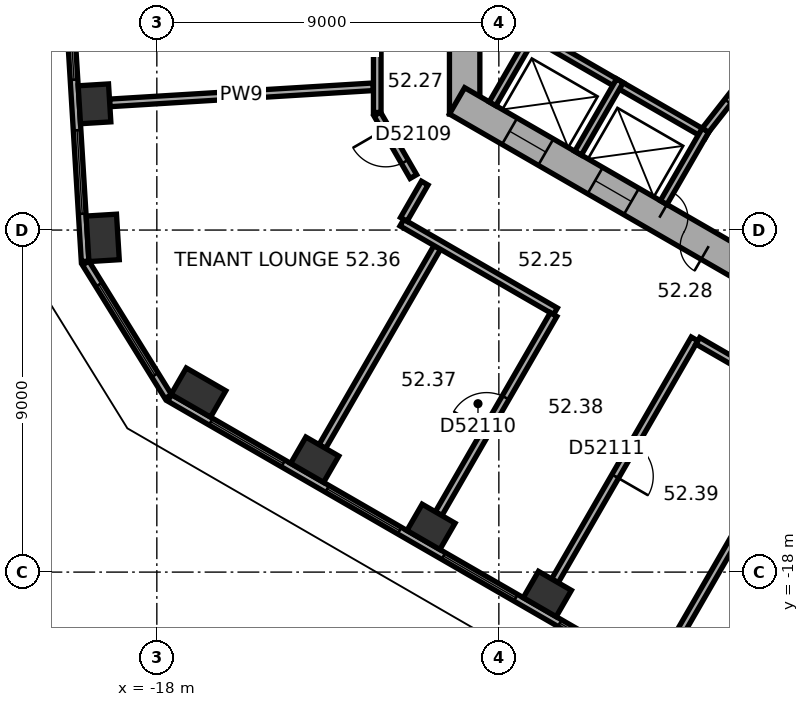
"""IFC4 building model, lengths in metres.
Left out: names, types, materials, properties, quantities, classifications, styles, units other than length and angle.
Written with IfcOpenShell. Run it as: python <this file> out.ifc"""

import sys

from ifc_helpers import new_model, si_unit, direction, frame, frame_2d, origin, origin_2d, place, context, subcontext, project, spatial, rectangle, extrude, element, fill, save


model = new_model("IFC4")
c1 = context("Model", 3, precision=1e-05, world=origin(), true_north=direction((0.0, 1.0)))
c2 = subcontext(c1, "Body", "Model", "MODEL_VIEW")
j1 = project(units=[si_unit("LENGTHUNIT", "METRE"), si_unit("PLANEANGLEUNIT", "RADIAN")], contexts=[c1])
p1 = place(None, origin())
s1 = spatial("IfcSite", under=j1, at=p1, CompositionType="ELEMENT")
p2 = place(p1, origin())
s2 = spatial("IfcBuilding", under=s1, at=p2, CompositionType="ELEMENT")
p3 = place(p2, frame((0.0, 0.0, 210.6)))
s3 = spatial("IfcBuildingStorey", under=s2, at=p3, CompositionType="ELEMENT", Elevation=210.6)
p4 = place(p3, frame((-19.64, -5.679, 0.0), z_axis=(0.0, 0.0, 1.0), x_axis=(0.061048539535, -0.998134798422, 0.0)))
e1 = element("IfcColumn", 1, at=p4, inside=s3, PredefinedType="COLUMN", context=c2, shape_type="SweptSolid", body=[
    extrude(rectangle(XDim=1.0, YDim=0.8, at=origin_2d()), origin(), (0.0, 0.0, 1.0), 3.7),
])
for number, where, z_axis, x_axis in (
    (2, (-19.424, -9.206, 0.0), (0.0, 0.0, 1.0), (0.061, -0.998, 0.0)),
    (3, (-16.906, -13.276, 0.0), (0.0, 0.0, 1.0), (0.866, -0.5, 0.0)),
):
    element("IfcColumn", number, at=place(p3, frame(where, z_axis=z_axis, x_axis=x_axis)), inside=s3, PredefinedType="COLUMN", context=c2, shape_type="SweptSolid", body=[
        extrude(rectangle(XDim=1.2, YDim=0.8, at=origin_2d()), origin(), (0.0, 0.0, 1.0), 3.7),
    ])
for number, where, z_axis, x_axis in (
    (4, (-13.845, -15.042, 0.0), (0.0, 0.0, 1.0), (0.866, -0.5, 0.0)),
    (5, (-10.785, -16.809, 0.0), (0.0, 0.0, 1.0), (0.866, -0.5, 0.0)),
    (6, (-7.725, -18.576, 0.0), (0.0, 0.0, 1.0), (0.866, -0.5, 0.0)),
):
    element("IfcColumn", number, at=place(p3, frame(where, z_axis=z_axis, x_axis=x_axis)), inside=s3, PredefinedType="COLUMN", context=c2, shape_type="SweptSolid", body=[
        extrude(rectangle(XDim=1.0, YDim=0.8, at=origin_2d()), origin(), (0.0, 0.0, 1.0), 3.7),
    ])
p5 = place(p3, frame((-9.9, 5.947, 0.0), z_axis=(0.0, 0.0, 1.0), x_axis=(0.0, -1.0, 0.0)))
e7 = element("IfcWall", 7, at=p5, inside=s3, PredefinedType="SHEAR", context=c2, shape_type="SweptSolid", body=[
    extrude(rectangle(XDim=11.894, YDim=0.8, at=frame_2d((5.947, 0.0))), origin(), (0.0, 0.0, 1.0), 3.7),
])
p6 = place(p5, frame((5.097, 0.0, 0.0)))
e8 = element("IfcOpeningElement", 8, at=p6, cuts=e7, PredefinedType="OPENING", context=c2, shape_type="SweptSolid", body=[
    extrude(rectangle(XDim=1.1, YDim=2.1, at=frame_2d((0.55, 1.05))), frame((0.0, 0.41, 0.0), z_axis=(0.0, -1.0, 0.0), x_axis=(1.0, 0.0, 0.0)), (0.0, 0.0, 1.0), 0.82),
])
p7 = place(p5, frame((7.697, 0.0, 0.0)))
e9 = element("IfcOpeningElement", 9, at=p7, cuts=e7, PredefinedType="OPENING", context=c2, shape_type="SweptSolid", body=[
    extrude(rectangle(XDim=1.1, YDim=2.1, at=frame_2d((0.55, 1.05))), frame((0.0, 0.41, 0.0), z_axis=(0.0, -1.0, 0.0), x_axis=(1.0, 0.0, 0.0)), (0.0, 0.0, 1.0), 0.82),
])
p8 = place(p3, frame((-10.1, -5.6, 0.0), z_axis=(0.0, 0.0, 1.0), x_axis=(0.866023897231, -0.500002609418, 0.0)))
e10 = element("IfcWall", 10, at=p8, inside=s3, PredefinedType="SHEAR", context=c2, shape_type="SweptSolid", body=[
    extrude(rectangle(XDim=11.894, YDim=0.8, at=frame_2d((5.947, 0.0))), origin(), (0.0, 0.0, 1.0), 3.7),
])
p9 = place(p8, frame((6.147, 0.0, 0.0)))
e11 = element("IfcOpeningElement", 11, at=p9, cuts=e10, PredefinedType="OPENING", context=c2, shape_type="SweptSolid", body=[
    extrude(rectangle(XDim=1.5, YDim=2.1, at=frame_2d((0.75, 1.05))), frame((0.0, 0.41, 0.0), z_axis=(0.0, -1.0, 0.0), x_axis=(1.0, 0.0, 0.0)), (0.0, 0.0, 1.0), 0.82),
])
p10 = place(p8, frame((1.597, 0.0, 0.0)))
e12 = element("IfcOpeningElement", 12, at=p10, cuts=e10, PredefinedType="OPENING", context=c2, shape_type="SweptSolid", body=[
    extrude(rectangle(XDim=1.1, YDim=2.1, at=frame_2d((0.55, 1.05))), frame((0.0, 0.41, 0.0), z_axis=(0.0, -1.0, 0.0), x_axis=(1.0, 0.0, 0.0)), (0.0, 0.0, 1.0), 0.82),
])
p11 = place(p8, frame((4.197, 0.0, 0.0)))
e13 = element("IfcOpeningElement", 13, at=p11, cuts=e10, PredefinedType="OPENING", context=c2, shape_type="SweptSolid", body=[
    extrude(rectangle(XDim=1.1, YDim=2.1, at=frame_2d((0.55, 1.05))), frame((0.0, 0.41, 0.0), z_axis=(0.0, -1.0, 0.0), x_axis=(1.0, 0.0, 0.0)), (0.0, 0.0, 1.0), 0.82),
])
p12 = place(p3, frame((-21.038, 8.984, 0.0), z_axis=(0.0, 0.0, 1.0), x_axis=(0.061043935634, -0.998135079998, 0.0)))
e14 = element("IfcWall", 14, at=p12, inside=s3, PredefinedType="STANDARD", context=c2, shape_type="SweptSolid", body=[
    extrude(rectangle(XDim=18.841, YDim=0.2, at=frame_2d((9.421, 0.0))), origin(), (0.0, 0.0, 1.0), 3.7),
])
p13 = place(p12, frame((1.253, 0.0, 0.9)))
e15 = element("IfcOpeningElement", 15, at=p13, cuts=e14, PredefinedType="OPENING", context=c2, shape_type="SweptSolid", body=[
    extrude(rectangle(XDim=2.2, YDim=2.0, at=frame_2d((1.1, 1.0))), frame((0.0, 0.11, 0.0), z_axis=(0.0, -1.0, 0.0), x_axis=(1.0, 0.0, 0.0)), (0.0, 0.0, 1.0), 0.22),
])
p14 = place(p12, frame((4.786, 0.0, 0.9)))
e16 = element("IfcOpeningElement", 16, at=p14, cuts=e14, PredefinedType="OPENING", context=c2, shape_type="SweptSolid", body=[
    extrude(rectangle(XDim=2.2, YDim=2.0, at=frame_2d((1.1, 1.0))), frame((0.0, 0.11, 0.0), z_axis=(0.0, -1.0, 0.0), x_axis=(1.0, 0.0, 0.0)), (0.0, 0.0, 1.0), 0.22),
])
p15 = place(p12, frame((8.32, 0.0, 0.9)))
e17 = element("IfcOpeningElement", 17, at=p15, cuts=e14, PredefinedType="OPENING", context=c2, shape_type="SweptSolid", body=[
    extrude(rectangle(XDim=2.2, YDim=2.0, at=frame_2d((1.1, 1.0))), frame((0.0, 0.11, 0.0), z_axis=(0.0, -1.0, 0.0), x_axis=(1.0, 0.0, 0.0)), (0.0, 0.0, 1.0), 0.22),
])
p16 = place(p12, frame((11.854, 0.0, 0.9)))
e18 = element("IfcOpeningElement", 18, at=p16, cuts=e14, PredefinedType="OPENING", context=c2, shape_type="SweptSolid", body=[
    extrude(rectangle(XDim=2.2, YDim=2.0, at=frame_2d((1.1, 1.0))), frame((0.0, 0.11, 0.0), z_axis=(0.0, -1.0, 0.0), x_axis=(1.0, 0.0, 0.0)), (0.0, 0.0, 1.0), 0.22),
])
p17 = place(p12, frame((15.387, 0.0, 0.9)))
e19 = element("IfcOpeningElement", 19, at=p17, cuts=e14, PredefinedType="OPENING", context=c2, shape_type="SweptSolid", body=[
    extrude(rectangle(XDim=2.2, YDim=2.0, at=frame_2d((1.1, 1.0))), frame((0.0, 0.11, 0.0), z_axis=(0.0, -1.0, 0.0), x_axis=(1.0, 0.0, 0.0)), (0.0, 0.0, 1.0), 0.22),
])
p18 = place(p3, frame((-19.873, -9.869, 0.0), z_axis=(0.0, 0.0, 1.0), x_axis=(0.52626914263, -0.850318051975, 0.0)))
e20 = element("IfcWall", 20, at=p18, inside=s3, PredefinedType="STANDARD", context=c2, shape_type="SweptSolid", body=[
    extrude(rectangle(XDim=4.13, YDim=0.2, at=frame_2d((2.065, 0.0))), origin(), (0.0, 0.0, 1.0), 3.7),
])
p19 = place(p18, frame((0.665, 0.0, 0.9)))
e21 = element("IfcOpeningElement", 21, at=p19, cuts=e20, PredefinedType="OPENING", context=c2, shape_type="SweptSolid", body=[
    extrude(rectangle(XDim=2.8, YDim=2.0, at=frame_2d((1.4, 1.0))), frame((0.0, 0.11, 0.0), z_axis=(0.0, -1.0, 0.0), x_axis=(1.0, 0.0, 0.0)), (0.0, 0.0, 1.0), 0.22),
])
p20 = place(p3, frame((-17.664, -13.415, 0.0), z_axis=(0.0, 0.0, 1.0), x_axis=(0.866026555358, -0.49999800541, 0.0)))
e22 = element("IfcWall", 22, at=p20, inside=s3, PredefinedType="STANDARD", context=c2, shape_type="SweptSolid", body=[
    extrude(rectangle(XDim=18.841, YDim=0.2, at=frame_2d((9.421, 0.0))), origin(), (0.0, 0.0, 1.0), 3.7),
])
p21 = place(p20, frame((1.254, 0.0, 0.9)))
e23 = element("IfcOpeningElement", 23, at=p21, cuts=e22, PredefinedType="OPENING", context=c2, shape_type="SweptSolid", body=[
    extrude(rectangle(XDim=2.2, YDim=2.0, at=frame_2d((1.1, 1.0))), frame((0.0, 0.11, 0.0), z_axis=(0.0, -1.0, 0.0), x_axis=(1.0, 0.0, 0.0)), (0.0, 0.0, 1.0), 0.22),
])
p22 = place(p20, frame((4.788, 0.0, 0.9)))
e24 = element("IfcOpeningElement", 24, at=p22, cuts=e22, PredefinedType="OPENING", context=c2, shape_type="SweptSolid", body=[
    extrude(rectangle(XDim=2.2, YDim=2.0, at=frame_2d((1.1, 1.0))), frame((0.0, 0.11, 0.0), z_axis=(0.0, -1.0, 0.0), x_axis=(1.0, 0.0, 0.0)), (0.0, 0.0, 1.0), 0.22),
])
p23 = place(p20, frame((8.322, 0.0, 0.9)))
e25 = element("IfcOpeningElement", 25, at=p23, cuts=e22, PredefinedType="OPENING", context=c2, shape_type="SweptSolid", body=[
    extrude(rectangle(XDim=2.2, YDim=2.0, at=frame_2d((1.1, 1.0))), frame((0.0, 0.11, 0.0), z_axis=(0.0, -1.0, 0.0), x_axis=(1.0, 0.0, 0.0)), (0.0, 0.0, 1.0), 0.22),
])
p24 = place(p20, frame((11.855, 0.0, 0.9)))
e26 = element("IfcOpeningElement", 26, at=p24, cuts=e22, PredefinedType="OPENING", context=c2, shape_type="SweptSolid", body=[
    extrude(rectangle(XDim=2.2, YDim=2.0, at=frame_2d((1.1, 1.0))), frame((0.0, 0.11, 0.0), z_axis=(0.0, -1.0, 0.0), x_axis=(1.0, 0.0, 0.0)), (0.0, 0.0, 1.0), 0.22),
])
p25 = place(p20, frame((15.389, 0.0, 0.9)))
e27 = element("IfcOpeningElement", 27, at=p25, cuts=e22, PredefinedType="OPENING", context=c2, shape_type="SweptSolid", body=[
    extrude(rectangle(XDim=2.2, YDim=2.0, at=frame_2d((1.1, 1.0))), frame((0.0, 0.11, 0.0), z_axis=(0.0, -1.0, 0.0), x_axis=(1.0, 0.0, 0.0)), (0.0, 0.0, 1.0), 0.22),
])
p26 = place(p3, frame((-8.203, -3.809, 0.0), z_axis=(0.0, 0.0, 1.0), x_axis=(0.866028230842, -0.499995103361, 0.0)))
e28 = element("IfcWall", 28, at=p26, inside=s3, PredefinedType="PARTITIONING", context=c2, shape_type="SweptSolid", body=[
    extrude(rectangle(XDim=5.4, YDim=0.2, at=frame_2d((2.7, 0.0))), origin(), (0.0, 0.0, 1.0), 3.35),
])
for number, where, z_axis, x_axis in (
    (29, (-8.067, -3.772, 0.0), (0.0, 0.0, 1.0), (-0.5, -0.866, 0.0)),
    (30, (-5.815, -5.072, 0.0), (0.0, 0.0, 1.0), (-0.5, -0.866, 0.0)),
):
    element("IfcWall", number, at=place(p3, frame(where, z_axis=z_axis, x_axis=x_axis)), inside=s3, PredefinedType="PARTITIONING", context=c2, shape_type="SweptSolid", body=[
        extrude(rectangle(XDim=2.2, YDim=0.2, at=frame_2d((1.1, 0.0))), origin(), (0.0, 0.0, 1.0), 3.35),
    ])
p27 = place(p3, frame((-3.563, -6.372, 0.0), z_axis=(0.0, 0.0, 1.0), x_axis=(-0.499994660107, -0.866028486751, 0.0)))
e31 = element("IfcWall", 31, at=p27, inside=s3, PredefinedType="PARTITIONING", context=c2, shape_type="SweptSolid", body=[
    extrude(rectangle(XDim=2.2, YDim=0.2, at=frame_2d((1.1, 0.0))), origin(), (0.0, 0.0, 1.0), 3.35),
])
p28 = place(p3, frame((-1.712, -4.008, 0.0), z_axis=(0.0, 0.0, 1.0), x_axis=(-0.616549420702, -0.787316208287, 0.0)))
e32 = element("IfcWall", 32, at=p28, inside=s3, PredefinedType="PARTITIONING", context=c2, shape_type="SweptSolid", body=[
    extrude(rectangle(XDim=3.002, YDim=0.2, at=frame_2d((1.501, 0.0))), origin(), (0.0, 0.0, 1.0), 3.35),
])
p29 = place(p28, frame((1.15, 0.0, 0.0)))
e33 = element("IfcOpeningElement", 33, at=p29, cuts=e32, PredefinedType="OPENING", context=c2, shape_type="SweptSolid", body=[
    extrude(rectangle(XDim=0.9, YDim=2.1, at=frame_2d((0.45, 1.05))), frame((0.0, 0.11, 0.0), z_axis=(0.0, -1.0, 0.0), x_axis=(1.0, 0.0, 0.0)), (0.0, 0.0, 1.0), 0.22),
])
p30 = place(p3, frame((-19.241, -5.654, 0.0), z_axis=(0.0, 0.0, 1.0), x_axis=(0.998135538818, 0.061036432963, 0.0)))
e34 = element("IfcWall", 34, at=p30, inside=s3, PredefinedType="PARTITIONING", context=c2, shape_type="SweptSolid", body=[
    extrude(rectangle(XDim=6.944, YDim=0.2, at=frame_2d((3.472, 0.0))), origin(), (0.0, 0.0, 1.0), 2.65),
])
p31 = place(p3, frame((-13.646, -14.696, 0.0), z_axis=(0.0, 0.0, 1.0), x_axis=(0.500006596359, 0.866021595341, 0.0)))
e35 = element("IfcWall", 35, at=p31, inside=s3, PredefinedType="PARTITIONING", context=c2, shape_type="SweptSolid", body=[
    extrude(rectangle(XDim=6.049, YDim=0.2, at=frame_2d((3.025, 0.0))), origin(), (0.0, 0.0, 1.0), 3.35),
])
p32 = place(p3, frame((-12.2, -5.947, 0.0), z_axis=(0.0, 0.0, 1.0), x_axis=(0.500022797313, -0.86601224135, 0.0)))
e36 = element("IfcWall", 36, at=p32, inside=s3, PredefinedType="PARTITIONING", context=c2, shape_type="SweptSolid", body=[
    extrude(rectangle(XDim=1.9, YDim=0.2, at=frame_2d((0.95, 0.0))), origin(), (0.0, 0.0, 1.0), 3.35),
])
p33 = place(p32, frame((0.45, 0.0, 0.0)))
e37 = element("IfcOpeningElement", 37, at=p33, cuts=e36, PredefinedType="OPENING", context=c2, shape_type="SweptSolid", body=[
    extrude(rectangle(XDim=1.0, YDim=2.1, at=frame_2d((0.5, 1.05))), frame((0.0, 0.11, 0.0), z_axis=(0.0, -1.0, 0.0), x_axis=(1.0, 0.0, 0.0)), (0.0, 0.0, 1.0), 0.22),
])
p34 = place(p3, frame((-12.2, -4.201, 0.0), z_axis=(0.0, 0.0, 1.0), x_axis=(0.0, -1.0, 0.0)))
e38 = element("IfcWall", 38, at=p34, inside=s3, PredefinedType="PARTITIONING", context=c2, shape_type="SweptSolid", body=[
    extrude(rectangle(XDim=1.706, YDim=0.2, at=frame_2d((0.853, 0.0))), origin(), (0.0, 0.0, 1.0), 3.35),
])
p35 = place(p3, frame((-11.551, -8.805, 0.0), z_axis=(0.0, 0.0, 1.0), x_axis=(0.866038310922, -0.499977643516, 0.0)))
e39 = element("IfcWall", 39, at=p35, inside=s3, PredefinedType="PARTITIONING", context=c2, shape_type="SweptSolid", body=[
    extrude(rectangle(XDim=4.665, YDim=0.2, at=frame_2d((2.333, 0.0))), origin(), (0.0, 0.0, 1.0), 3.35),
])
p36 = place(p3, frame((-10.951, -7.765, 0.0), z_axis=(0.0, 0.0, 1.0), x_axis=(-0.499978356969, -0.866037899034, 0.0)))
e40 = element("IfcWall", 40, at=p36, inside=s3, PredefinedType="PARTITIONING", context=c2, shape_type="SweptSolid", body=[
    extrude(rectangle(XDim=1.101, YDim=0.2, at=frame_2d((0.551, 0.0))), origin(), (0.0, 0.0, 1.0), 3.35),
])
p37 = place(p3, frame((-10.585, -16.463, 0.0), z_axis=(0.0, 0.0, 1.0), x_axis=(0.499993802756, 0.866028981735, 0.0)))
e41 = element("IfcWall", 41, at=p37, inside=s3, PredefinedType="PARTITIONING", context=c2, shape_type="SweptSolid", body=[
    extrude(rectangle(XDim=6.049, YDim=0.2, at=frame_2d((3.024, 0.0))), origin(), (0.0, 0.0, 1.0), 2.65),
])
p38 = place(p37, frame((2.524, 0.0, 0.0)))
e42 = element("IfcOpeningElement", 42, at=p38, cuts=e41, PredefinedType="OPENING", context=c2, shape_type="SweptSolid", body=[
    extrude(rectangle(XDim=1.0, YDim=2.1, at=frame_2d((0.5, 1.05))), frame((0.0, 0.11, 0.0), z_axis=(0.0, -1.0, 0.0), x_axis=(1.0, 0.0, 0.0)), (0.0, 0.0, 1.0), 0.22),
])
p39 = place(p3, frame((-7.525, -18.23, 0.0), z_axis=(0.0, 0.0, 1.0), x_axis=(0.499983153418, 0.866035129944, 0.0)))
e43 = element("IfcWall", 43, at=p39, inside=s3, PredefinedType="PARTITIONING", context=c2, shape_type="SweptSolid", body=[
    extrude(rectangle(XDim=7.35, YDim=0.2, at=frame_2d((3.675, 0.0))), origin(), (0.0, 0.0, 1.0), 3.35),
])
p40 = place(p39, frame((3.175, 0.0, 0.0)))
e44 = element("IfcOpeningElement", 44, at=p40, cuts=e43, PredefinedType="OPENING", context=c2, shape_type="SweptSolid", body=[
    extrude(rectangle(XDim=1.0, YDim=2.1, at=frame_2d((0.5, 1.05))), frame((0.0, 0.11, 0.0), z_axis=(0.0, -1.0, 0.0), x_axis=(1.0, 0.0, 0.0)), (0.0, 0.0, 1.0), 0.22),
])
p41 = place(p3, frame((-4.465, -19.997, 0.0), z_axis=(0.0, 0.0, 1.0), x_axis=(0.500011802906, 0.866018589266, 0.0)))
e45 = element("IfcWall", 45, at=p41, inside=s3, PredefinedType="PARTITIONING", context=c2, shape_type="SweptSolid", body=[
    extrude(rectangle(XDim=7.377, YDim=0.2, at=frame_2d((3.688, 0.0))), origin(), (0.0, 0.0, 1.0), 3.35),
])
p42 = place(p3, frame((-3.763, -11.915, 0.0), z_axis=(0.0, 0.0, 1.0), x_axis=(0.866037915695, -0.499978328108, 0.0)))
e46 = element("IfcWall", 46, at=p42, inside=s3, PredefinedType="PARTITIONING", context=c2, shape_type="SweptSolid", body=[
    extrude(rectangle(XDim=3.249, YDim=0.2, at=frame_2d((1.625, 0.0))), origin(), (0.0, 0.0, 1.0), 3.35),
])
p43 = place(p16, origin())
e47 = element("IfcWindow", 47, at=p43, inside=s3, PartitioningType="SINGLE_PANEL", PredefinedType="WINDOW", context=c2, shape_type="SweptSolid", body=[
    extrude(rectangle(XDim=2.2, YDim=2.0, at=frame_2d((1.1, 1.0))), frame((0.0, 0.03, 0.0), z_axis=(0.0, -1.0, 0.0), x_axis=(1.0, 0.0, 0.0)), (0.0, 0.0, 1.0), 0.06),
])
fill(e18, e47)
p44 = place(p17, origin())
e48 = element("IfcWindow", 48, at=p44, inside=s3, PartitioningType="SINGLE_PANEL", PredefinedType="WINDOW", context=c2, shape_type="SweptSolid", body=[
    extrude(rectangle(XDim=2.2, YDim=2.0, at=frame_2d((1.1, 1.0))), frame((0.0, 0.03, 0.0), z_axis=(0.0, -1.0, 0.0), x_axis=(1.0, 0.0, 0.0)), (0.0, 0.0, 1.0), 0.06),
])
fill(e19, e48)
p45 = place(p19, origin())
e49 = element("IfcWindow", 49, at=p45, inside=s3, PartitioningType="SINGLE_PANEL", PredefinedType="WINDOW", context=c2, shape_type="SweptSolid", body=[
    extrude(rectangle(XDim=2.8, YDim=2.0, at=frame_2d((1.4, 1.0))), frame((0.0, 0.03, 0.0), z_axis=(0.0, -1.0, 0.0), x_axis=(1.0, 0.0, 0.0)), (0.0, 0.0, 1.0), 0.06),
])
fill(e21, e49)
p46 = place(p21, origin())
e50 = element("IfcWindow", 50, at=p46, inside=s3, PartitioningType="SINGLE_PANEL", PredefinedType="WINDOW", context=c2, shape_type="SweptSolid", body=[
    extrude(rectangle(XDim=2.2, YDim=2.0, at=frame_2d((1.1, 1.0))), frame((0.0, 0.03, 0.0), z_axis=(0.0, -1.0, 0.0), x_axis=(1.0, 0.0, 0.0)), (0.0, 0.0, 1.0), 0.06),
])
fill(e23, e50)
p47 = place(p22, origin())
e51 = element("IfcWindow", 51, at=p47, inside=s3, PartitioningType="SINGLE_PANEL", PredefinedType="WINDOW", context=c2, shape_type="SweptSolid", body=[
    extrude(rectangle(XDim=2.2, YDim=2.0, at=frame_2d((1.1, 1.0))), frame((0.0, 0.03, 0.0), z_axis=(0.0, -1.0, 0.0), x_axis=(1.0, 0.0, 0.0)), (0.0, 0.0, 1.0), 0.06),
])
fill(e24, e51)
p48 = place(p23, origin())
e52 = element("IfcWindow", 52, at=p48, inside=s3, PartitioningType="SINGLE_PANEL", PredefinedType="WINDOW", context=c2, shape_type="SweptSolid", body=[
    extrude(rectangle(XDim=2.2, YDim=2.0, at=frame_2d((1.1, 1.0))), frame((0.0, 0.03, 0.0), z_axis=(0.0, -1.0, 0.0), x_axis=(1.0, 0.0, 0.0)), (0.0, 0.0, 1.0), 0.06),
])
fill(e25, e52)
p49 = place(p24, origin())
e53 = element("IfcWindow", 53, at=p49, inside=s3, PartitioningType="SINGLE_PANEL", PredefinedType="WINDOW", context=c2, shape_type="SweptSolid", body=[
    extrude(rectangle(XDim=2.2, YDim=2.0, at=frame_2d((1.1, 1.0))), frame((0.0, 0.03, 0.0), z_axis=(0.0, -1.0, 0.0), x_axis=(1.0, 0.0, 0.0)), (0.0, 0.0, 1.0), 0.06),
])
fill(e26, e53)
p50 = place(p9, origin())
e54 = element("IfcDoor", 54, at=p50, inside=s3, OperationType="DOUBLE_DOOR_SINGLE_SWING", PredefinedType="DOOR", context=c2, shape_type="SweptSolid", body=[
    extrude(rectangle(XDim=1.5, YDim=2.1, at=frame_2d((0.75, 1.05))), frame((0.0, 0.025, 0.0), z_axis=(0.0, -1.0, 0.0), x_axis=(1.0, 0.0, 0.0)), (0.0, 0.0, 1.0), 0.05),
])
fill(e11, e54)
p51 = place(p29, origin())
e55 = element("IfcDoor", 55, at=p51, inside=s3, OperationType="SINGLE_SWING_LEFT", PredefinedType="DOOR", context=c2, shape_type="SweptSolid", body=[
    extrude(rectangle(XDim=0.9, YDim=2.1, at=frame_2d((0.45, 1.05))), frame((0.0, 0.025, 0.0), z_axis=(0.0, -1.0, 0.0), x_axis=(1.0, 0.0, 0.0)), (0.0, 0.0, 1.0), 0.05),
])
fill(e33, e55)
p52 = place(p10, origin())
e56 = element("IfcDoor", 56, at=p52, inside=s3, OperationType="DOUBLE_DOOR_SLIDING", PredefinedType="DOOR", context=c2, shape_type="SweptSolid", body=[
    extrude(rectangle(XDim=1.1, YDim=2.1, at=frame_2d((0.55, 1.05))), frame((0.0, 0.025, 0.0), z_axis=(0.0, -1.0, 0.0), x_axis=(1.0, 0.0, 0.0)), (0.0, 0.0, 1.0), 0.05),
])
fill(e12, e56)
p53 = place(p11, origin())
e57 = element("IfcDoor", 57, at=p53, inside=s3, OperationType="DOUBLE_DOOR_SLIDING", PredefinedType="DOOR", context=c2, shape_type="SweptSolid", body=[
    extrude(rectangle(XDim=1.1, YDim=2.1, at=frame_2d((0.55, 1.05))), frame((0.0, 0.025, 0.0), z_axis=(0.0, -1.0, 0.0), x_axis=(1.0, 0.0, 0.0)), (0.0, 0.0, 1.0), 0.05),
])
fill(e13, e57)
p54 = place(p33, origin())
e58 = element("IfcDoor", 58, at=p54, inside=s3, OperationType="SINGLE_SWING_LEFT", PredefinedType="DOOR", context=c2, shape_type="SweptSolid", body=[
    extrude(rectangle(XDim=1.0, YDim=2.1, at=frame_2d((0.5, 1.05))), frame((0.0, 0.025, 0.0), z_axis=(0.0, -1.0, 0.0), x_axis=(1.0, 0.0, 0.0)), (0.0, 0.0, 1.0), 0.05),
])
fill(e37, e58)
p55 = place(p38, origin())
e59 = element("IfcDoor", 59, at=p55, inside=s3, OperationType="SINGLE_SWING_LEFT", PredefinedType="DOOR", context=c2, shape_type="SweptSolid", body=[
    extrude(rectangle(XDim=1.0, YDim=2.1, at=frame_2d((0.5, 1.05))), frame((0.0, 0.025, 0.0), z_axis=(0.0, -1.0, 0.0), x_axis=(1.0, 0.0, 0.0)), (0.0, 0.0, 1.0), 0.05),
])
fill(e42, e59)
p56 = place(p40, origin())
e60 = element("IfcDoor", 60, at=p56, inside=s3, OperationType="SINGLE_SWING_LEFT", PredefinedType="DOOR", context=c2, shape_type="SweptSolid", body=[
    extrude(rectangle(XDim=1.0, YDim=2.1, at=frame_2d((0.5, 1.05))), frame((0.0, 0.025, 0.0), z_axis=(0.0, -1.0, 0.0), x_axis=(1.0, 0.0, 0.0)), (0.0, 0.0, 1.0), 0.05),
])
fill(e44, e60)
save(model, sys.argv[1])
